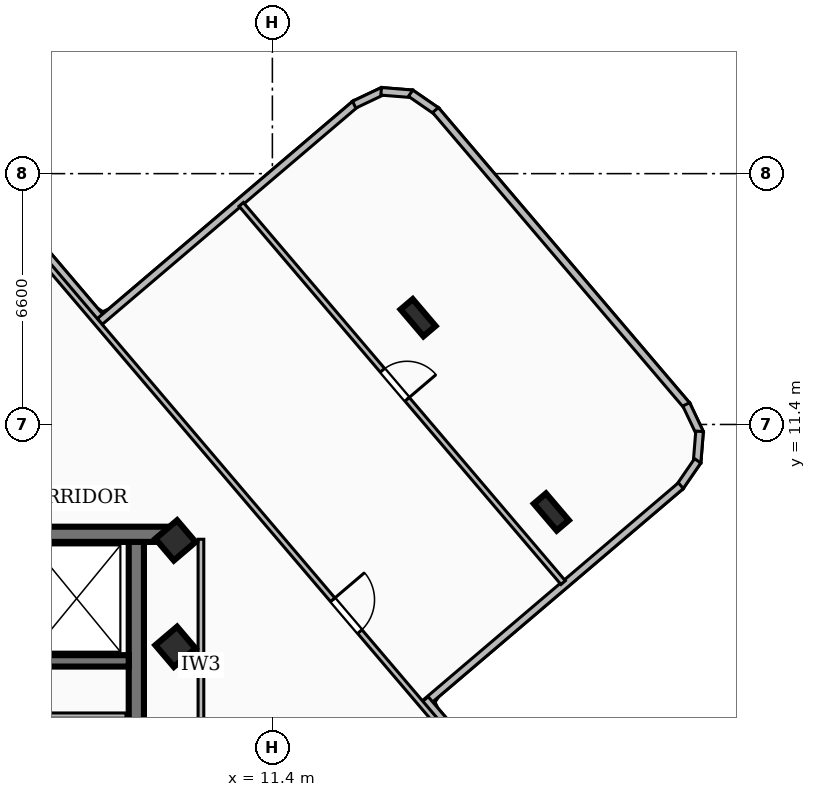
"""IFC4 building model, lengths in metres.
Left out: names, types, materials, properties, quantities, classifications, styles, units other than length and angle.
Written with IfcOpenShell. Run it as: python <this file> out.ifc"""

import sys

from ifc_helpers import new_model, si_unit, direction, frame, frame_2d, origin, origin_2d, place, context, subcontext, project, spatial, rectangle, i_section, extrude, element, fill, save


model = new_model("IFC4")
c1 = context("Model", 3, precision=1e-05, world=origin(), true_north=direction((0.0, 1.0)))
c2 = subcontext(c1, "Body", "Model", "MODEL_VIEW")
j1 = project(units=[si_unit("LENGTHUNIT", "METRE"), si_unit("PLANEANGLEUNIT", "RADIAN")], contexts=[c1])
p1 = place(None, origin())
s1 = spatial("IfcSite", under=j1, at=p1, CompositionType="ELEMENT")
p2 = place(p1, origin())
s2 = spatial("IfcBuilding", under=s1, at=p2, CompositionType="ELEMENT")
p3 = place(p2, frame((0.0, 0.0, 239.4)))
s3 = spatial("IfcBuildingStorey", under=s2, at=p3, CompositionType="ELEMENT", Elevation=239.4)
p4 = place(p3, frame((-8.78, 8.51, 0.0), z_axis=(0.0, 0.0, 1.0), x_axis=(1.0, 0.0, 0.0)))
e1 = element("IfcWall", 1, at=p4, inside=s3, PredefinedType="SHEAR", context=c2, shape_type="SweptSolid", body=[
    extrude(rectangle(XDim=17.56, YDim=0.4, at=frame_2d((8.78, 0.0))), origin(), (0.0, 0.0, 1.0), 4.42),
])
p5 = place(p3, frame((7.82, 8.31, 0.0), z_axis=(0.0, 0.0, 1.0), x_axis=(0.0, -1.0, 0.0)))
e2 = element("IfcWall", 2, at=p5, inside=s3, PredefinedType="SHEAR", context=c2, shape_type="SweptSolid", body=[
    extrude(rectangle(XDim=6.36, YDim=0.4, at=frame_2d((3.18, 0.0))), origin(), (0.0, 0.0, 1.0), 4.42),
])
p6 = place(p3, frame((7.62, 5.18, 0.0), z_axis=(0.0, 0.0, 1.0), x_axis=(-1.0, 0.0, 0.0)))
e3 = element("IfcWall", 3, at=p6, inside=s3, PredefinedType="SOLIDWALL", context=c2, shape_type="SweptSolid", body=[
    extrude(rectangle(XDim=15.24, YDim=0.3, at=frame_2d((7.62, 0.0))), origin(), (0.0, 0.0, 1.0), 4.42),
])
p7 = place(p6, frame((5.77, 0.0, 0.0)))
e4 = element("IfcOpeningElement", 4, at=p7, cuts=e3, PredefinedType="OPENING", context=c2, shape_type="SweptSolid", body=[
    extrude(rectangle(XDim=1.1, YDim=2.15, at=frame_2d((0.55, 1.075))), frame((0.0, 0.16, 0.0), z_axis=(0.0, -1.0, 0.0), x_axis=(1.0, 0.0, 0.0)), (0.0, 0.0, 1.0), 0.32),
])
p8 = place(p6, frame((2.97, 0.0, 0.0)))
e5 = element("IfcOpeningElement", 5, at=p8, cuts=e3, PredefinedType="OPENING", context=c2, shape_type="SweptSolid", body=[
    extrude(rectangle(XDim=1.1, YDim=2.15, at=frame_2d((0.55, 1.075))), frame((0.0, 0.16, 0.0), z_axis=(0.0, -1.0, 0.0), x_axis=(1.0, 0.0, 0.0)), (0.0, 0.0, 1.0), 0.32),
])
p9 = place(p6, frame((7.97, 0.0, 0.0)))
e6 = element("IfcOpeningElement", 6, at=p9, cuts=e3, PredefinedType="OPENING", context=c2, shape_type="SweptSolid", body=[
    extrude(rectangle(XDim=1.0, YDim=2.1, at=frame_2d((0.5, 1.05))), frame((0.0, 0.16, 0.0), z_axis=(0.0, -1.0, 0.0), x_axis=(1.0, 0.0, 0.0)), (0.0, 0.0, 1.0), 0.32),
])
for number, where, z_axis, x_axis in (
    (7, (8.85, 5.55, 0.0), (0.0, 0.0, 1.0), (0.762, 0.648, 0.0)),
    (8, (8.85, 8.35, 0.0), (0.0, 0.0, 1.0), (0.762, 0.648, 0.0)),
):
    element("IfcColumn", number, at=place(p3, frame(where, z_axis=z_axis, x_axis=x_axis)), inside=s3, PredefinedType="COLUMN", context=c2, shape_type="SweptSolid", body=[
        extrude(rectangle(XDim=0.75, YDim=0.75, at=origin_2d()), origin(), (0.0, 0.0, 1.0), 4.68),
    ])
for number, where, z_axis, x_axis in (
    (9, (18.741, 9.097, 0.0), (0.0, 0.0, 1.0), (0.762, 0.648, 0.0)),
    (10, (15.234, 14.209, 0.0), (0.0, 0.0, 1.0), (0.762, 0.648, 0.0)),
):
    element("IfcColumn", number, at=place(p3, frame(where, z_axis=z_axis, x_axis=x_axis)), inside=s3, PredefinedType="COLUMN", context=c2, shape_type="SweptSolid", body=[
        extrude(i_section(OverallWidth=0.418, OverallDepth=0.927, WebThickness=0.019, FlangeThickness=0.032, at=origin_2d()), origin(), (0.0, 0.0, 1.0), 4.68),
    ])
p10 = place(p3, frame((2.604, 19.236, 0.0), z_axis=(0.0, 0.0, 1.0), x_axis=(0.648076175867, -0.761575518431, 0.0)))
e11 = element("IfcWall", 11, at=p10, inside=s3, PredefinedType="SOLIDWALL", context=c2, shape_type="SweptSolid", body=[
    extrude(rectangle(XDim=6.741, YDim=0.2, at=frame_2d((3.371, 0.0))), origin(), (0.0, 0.0, 1.0), 2.212),
])
p11 = place(p3, frame((6.86, 14.111, 0.0), z_axis=(0.0, 0.0, 1.0), x_axis=(0.761539969586, 0.648117948157, 0.0)))
e12 = element("IfcWall", 12, at=p11, inside=s3, PredefinedType="SOLIDWALL", context=c2, shape_type="SweptSolid", body=[
    extrude(rectangle(XDim=8.843, YDim=0.2, at=frame_2d((4.421, 0.0))), origin(), (0.0, 0.0, 1.0), 2.212),
])
p12 = place(p3, frame((13.552, 19.815, 0.0), z_axis=(0.0, 0.0, 1.0), x_axis=(0.903263411017, 0.429086483494, 0.0)))
e13 = element("IfcWall", 13, at=p12, inside=s3, PredefinedType="SOLIDWALL", context=c2, shape_type="SweptSolid", body=[
    extrude(rectangle(XDim=0.839, YDim=0.2, at=frame_2d((0.42, 0.0))), origin(), (0.0, 0.0, 1.0), 4.42),
])
p13 = place(p3, frame((14.262, 20.166, 0.0), z_axis=(0.0, 0.0, 1.0), x_axis=(0.996800199392, -0.079933487923, 0.0)))
e14 = element("IfcWall", 14, at=p13, inside=s3, PredefinedType="SOLIDWALL", context=c2, shape_type="SweptSolid", body=[
    extrude(rectangle(XDim=0.825, YDim=0.2, at=frame_2d((0.412, 0.0))), origin(), (0.0, 0.0, 1.0), 4.42),
])
p14 = place(p3, frame((15.038, 20.116, 0.0), z_axis=(0.0, 0.0, 1.0), x_axis=(0.823447180448, -0.567392933524, 0.0)))
e15 = element("IfcWall", 15, at=p14, inside=s3, PredefinedType="SOLIDWALL", context=c2, shape_type="SweptSolid", body=[
    extrude(rectangle(XDim=0.839, YDim=0.2, at=frame_2d((0.419, 0.0))), origin(), (0.0, 0.0, 1.0), 4.42),
])
p15 = place(p3, frame((15.692, 19.673, 0.0), z_axis=(0.0, 0.0, 1.0), x_axis=(0.648033760004, -0.761611610925, 0.0)))
e16 = element("IfcWall", 16, at=p15, inside=s3, PredefinedType="SOLIDWALL", context=c2, shape_type="SweptSolid", body=[
    extrude(rectangle(XDim=10.223, YDim=0.2, at=frame_2d((5.112, 0.0))), origin(), (0.0, 0.0, 1.0), 4.42),
])
p16 = place(p3, frame((22.29, 11.929, 0.0), z_axis=(0.0, 0.0, 1.0), x_axis=(0.428849093201, -0.903376142734, 0.0)))
e17 = element("IfcWall", 17, at=p16, inside=s3, PredefinedType="SOLIDWALL", context=c2, shape_type="SweptSolid", body=[
    extrude(rectangle(XDim=0.839, YDim=0.2, at=frame_2d((0.419, 0.0))), origin(), (0.0, 0.0, 1.0), 4.42),
])
p17 = place(p3, frame((22.641, 11.219, 0.0), z_axis=(0.0, 0.0, 1.0), x_axis=(-0.080227635853, -0.996776567966, 0.0)))
e18 = element("IfcWall", 18, at=p17, inside=s3, PredefinedType="SOLIDWALL", context=c2, shape_type="SweptSolid", body=[
    extrude(rectangle(XDim=0.825, YDim=0.2, at=frame_2d((0.412, 0.0))), origin(), (0.0, 0.0, 1.0), 4.42),
])
p18 = place(p3, frame((22.591, 10.443, 0.0), z_axis=(0.0, 0.0, 1.0), x_axis=(-0.56646705089, -0.824084389038, 0.0)))
e19 = element("IfcWall", 19, at=p18, inside=s3, PredefinedType="SOLIDWALL", context=c2, shape_type="SweptSolid", body=[
    extrude(rectangle(XDim=0.839, YDim=0.2, at=frame_2d((0.419, 0.0))), origin(), (0.0, 0.0, 1.0), 4.42),
])
p19 = place(p3, frame((22.149, 9.789, 0.0), z_axis=(0.0, 0.0, 1.0), x_axis=(-0.761594480481, -0.648053892281, 0.0)))
e20 = element("IfcWall", 20, at=p19, inside=s3, PredefinedType="SOLIDWALL", context=c2, shape_type="SweptSolid", body=[
    extrude(rectangle(XDim=8.842, YDim=0.2, at=frame_2d((4.421, 0.0))), origin(), (0.0, 0.0, 1.0), 2.212),
])
p20 = place(p3, frame((15.424, 4.172, 0.0), z_axis=(0.0, 0.0, 1.0), x_axis=(0.648070567789, -0.761580290689, 0.0)))
e21 = element("IfcWall", 21, at=p20, inside=s3, PredefinedType="SOLIDWALL", context=c2, shape_type="SweptSolid", body=[
    extrude(rectangle(XDim=6.143, YDim=0.2, at=frame_2d((3.071, 0.0))), origin(), (0.0, 0.0, 1.0), 2.212),
])
p21 = place(p3, frame((2.9, 3.74, 0.0), z_axis=(0.0, 0.0, 1.0), x_axis=(1.0, 0.0, 0.0)))
e22 = element("IfcWall", 22, at=p21, inside=s3, PredefinedType="PARTITIONING", context=c2, shape_type="SweptSolid", body=[
    extrude(rectangle(XDim=4.65, YDim=0.138, at=frame_2d((2.325, 0.0))), origin(), (0.0, 0.0, 1.0), 4.42),
])
p22 = place(p3, frame((5.9, 1.85, 0.0), z_axis=(0.0, 0.0, 1.0), x_axis=(0.0, 1.0, 0.0)))
e23 = element("IfcWall", 23, at=p22, inside=s3, PredefinedType="PARTITIONING", context=c2, shape_type="SweptSolid", body=[
    extrude(rectangle(XDim=1.89, YDim=0.138, at=frame_2d((0.945, 0.0))), origin(), (0.0, 0.0, 1.0), 3.65),
])
p23 = place(p3, frame((9.52, 1.75, 0.0), z_axis=(0.0, 0.0, 1.0), x_axis=(0.0, 1.0, 0.0)))
e24 = element("IfcWall", 24, at=p23, inside=s3, PredefinedType="PARTITIONING", context=c2, shape_type="SweptSolid", body=[
    extrude(rectangle(XDim=6.63, YDim=0.15, at=frame_2d((3.315, 0.0))), origin(), (0.0, 0.0, 1.0), 2.212),
])
p24 = place(p3, frame((4.045, 17.296, 0.0), z_axis=(0.0, 0.0, 1.0), x_axis=(0.648103934292, -0.761551896035, 0.0)))
e25 = element("IfcWall", 25, at=p24, inside=s3, PredefinedType="PARTITIONING", context=c2, shape_type="SweptSolid", body=[
    extrude(rectangle(XDim=20.5, YDim=0.15, at=frame_2d((10.25, 0.0))), origin(), (0.0, 0.0, 1.0), 2.212),
])
p25 = place(p24, frame((13.799, 0.0, 0.0)))
e26 = element("IfcOpeningElement", 26, at=p25, cuts=e25, PredefinedType="OPENING", context=c2, shape_type="SweptSolid", body=[
    extrude(rectangle(XDim=1.1, YDim=2.15, at=frame_2d((0.55, 1.075))), frame((0.0, 0.085, 0.0), z_axis=(0.0, -1.0, 0.0), x_axis=(1.0, 0.0, 0.0)), (0.0, 0.0, 1.0), 0.17),
])
p26 = place(p3, frame((10.58, 17.192, 0.0), z_axis=(0.0, 0.0, 1.0), x_axis=(0.648136838455, -0.761523892362, 0.0)))
e27 = element("IfcWall", 27, at=p26, inside=s3, PredefinedType="PARTITIONING", context=c2, shape_type="SweptSolid", body=[
    extrude(rectangle(XDim=13.07, YDim=0.15, at=frame_2d((6.535, 0.0))), origin(), (0.0, 0.0, 1.0), 2.212),
])
p27 = place(p26, frame((5.735, 0.0, 0.0)))
e28 = element("IfcOpeningElement", 28, at=p27, cuts=e27, PredefinedType="OPENING", context=c2, shape_type="SweptSolid", body=[
    extrude(rectangle(XDim=1.0, YDim=2.1, at=frame_2d((0.5, 1.05))), frame((0.0, 0.085, 0.0), z_axis=(0.0, -1.0, 0.0), x_axis=(1.0, 0.0, 0.0)), (0.0, 0.0, 1.0), 0.17),
])
p28 = place(p25, origin())
e29 = element("IfcDoor", 29, at=p28, inside=s3, OperationType="SINGLE_SWING_LEFT", PredefinedType="DOOR", context=c2, shape_type="SweptSolid", body=[
    extrude(rectangle(XDim=1.1, YDim=2.15, at=frame_2d((0.55, 1.075))), frame((0.0, 0.025, 0.0), z_axis=(0.0, -1.0, 0.0), x_axis=(1.0, 0.0, 0.0)), (0.0, 0.0, 1.0), 0.05),
])
fill(e26, e29)
p29 = place(p27, origin())
e30 = element("IfcDoor", 30, at=p29, inside=s3, OperationType="SINGLE_SWING_RIGHT", PredefinedType="DOOR", context=c2, shape_type="SweptSolid", body=[
    extrude(rectangle(XDim=1.0, YDim=2.1, at=frame_2d((0.5, 1.05))), frame((0.0, 0.025, 0.0), z_axis=(0.0, -1.0, 0.0), x_axis=(1.0, 0.0, 0.0)), (0.0, 0.0, 1.0), 0.05),
])
fill(e28, e30)
save(model, sys.argv[1])
